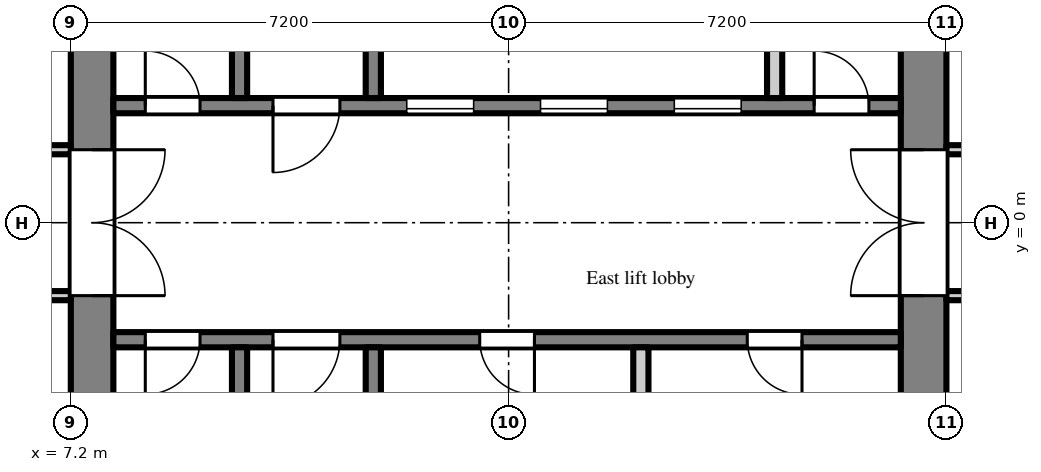
"""IFC4 building model, lengths in metres.
Left out: names, types, materials, properties, quantities, classifications, styles, units other than length and angle.
Written with IfcOpenShell. Run it as: python <this file> out.ifc"""

import sys

from ifc_helpers import new_model, si_unit, direction, frame, frame_2d, origin, place, context, subcontext, project, spatial, rectangle, extrude, element, fill, save


model = new_model("IFC4")
c1 = context("Model", 3, precision=1e-05, world=origin(), true_north=direction((0.0, 1.0)))
c2 = subcontext(c1, "Body", "Model", "MODEL_VIEW")
j1 = project(units=[si_unit("LENGTHUNIT", "METRE"), si_unit("PLANEANGLEUNIT", "RADIAN")], contexts=[c1])
p1 = place(None, origin())
s1 = spatial("IfcSite", under=j1, at=p1, CompositionType="ELEMENT")
p2 = place(p1, origin())
s2 = spatial("IfcBuilding", under=s1, at=p2, CompositionType="ELEMENT")
p3 = place(p2, frame((0.0, 0.0, 201.9)))
s3 = spatial("IfcBuildingStorey", under=s2, at=p3, CompositionType="ELEMENT", Elevation=201.9)
p4 = place(p3, frame((7.55, -7.2, 0.0), z_axis=(0.0, 0.0, 1.0), x_axis=(0.0, 1.0, 0.0)))
e1 = element("IfcWall", 1, at=p4, inside=s3, PredefinedType="SHEAR", context=c2, shape_type="SweptSolid", body=[
    extrude(rectangle(XDim=14.4, YDim=0.7, at=frame_2d((7.2, 0.0))), origin(), (0.0, 0.0, 1.0), 2.6),
])
p5 = place(p4, frame((6.0, 0.0, 0.0)))
e2 = element("IfcOpeningElement", 2, at=p5, cuts=e1, PredefinedType="OPENING", context=c2, shape_type="SweptSolid", body=[
    extrude(rectangle(XDim=2.4, YDim=2.2, at=frame_2d((1.2, 1.1))), frame((0.0, 0.36, 0.0), z_axis=(0.0, -1.0, 0.0), x_axis=(1.0, 0.0, 0.0)), (0.0, 0.0, 1.0), 0.72),
])
p6 = place(p3, frame((21.225, -7.2, 0.0), z_axis=(0.0, 0.0, 1.0), x_axis=(0.0, 1.0, 0.0)))
e3 = element("IfcWall", 3, at=p6, inside=s3, PredefinedType="SHEAR", context=c2, shape_type="SweptSolid", body=[
    extrude(rectangle(XDim=14.4, YDim=0.75, at=frame_2d((7.2, 0.0))), origin(), (0.0, 0.0, 1.0), 2.6),
])
p7 = place(p6, frame((6.0, 0.0, 0.0)))
e4 = element("IfcOpeningElement", 4, at=p7, cuts=e3, PredefinedType="OPENING", context=c2, shape_type="SweptSolid", body=[
    extrude(rectangle(XDim=2.4, YDim=2.2, at=frame_2d((1.2, 1.1))), frame((0.0, 0.385, 0.0), z_axis=(0.0, -1.0, 0.0), x_axis=(1.0, 0.0, 0.0)), (0.0, 0.0, 1.0), 0.77),
])
p8 = place(p3, frame((7.9, 1.925, 0.0), z_axis=(0.0, 0.0, 1.0), x_axis=(1.0, 0.0, 0.0)))
e5 = element("IfcWall", 5, at=p8, inside=s3, PredefinedType="SHEAR", context=c2, shape_type="SweptSolid", body=[
    extrude(rectangle(XDim=12.95, YDim=0.25, at=frame_2d((6.475, 0.0))), origin(), (0.0, 0.0, 1.0), 2.6),
])
p9 = place(p8, frame((4.825, 0.0, 0.0)))
e6 = element("IfcOpeningElement", 6, at=p9, cuts=e5, PredefinedType="OPENING", context=c2, shape_type="SweptSolid", body=[
    extrude(rectangle(XDim=1.1, YDim=2.1, at=frame_2d((0.55, 1.05))), frame((0.0, 0.135, 0.0), z_axis=(0.0, -1.0, 0.0), x_axis=(1.0, 0.0, 0.0)), (0.0, 0.0, 1.0), 0.27),
])
p10 = place(p8, frame((7.025, 0.0, 0.0)))
e7 = element("IfcOpeningElement", 7, at=p10, cuts=e5, PredefinedType="OPENING", context=c2, shape_type="SweptSolid", body=[
    extrude(rectangle(XDim=1.1, YDim=2.1, at=frame_2d((0.55, 1.05))), frame((0.0, 0.135, 0.0), z_axis=(0.0, -1.0, 0.0), x_axis=(1.0, 0.0, 0.0)), (0.0, 0.0, 1.0), 0.27),
])
p11 = place(p8, frame((9.225, 0.0, 0.0)))
e8 = element("IfcOpeningElement", 8, at=p11, cuts=e5, PredefinedType="OPENING", context=c2, shape_type="SweptSolid", body=[
    extrude(rectangle(XDim=1.1, YDim=2.1, at=frame_2d((0.55, 1.05))), frame((0.0, 0.135, 0.0), z_axis=(0.0, -1.0, 0.0), x_axis=(1.0, 0.0, 0.0)), (0.0, 0.0, 1.0), 0.27),
])
p12 = place(p8, frame((0.525, 0.0, 0.0)))
e9 = element("IfcOpeningElement", 9, at=p12, cuts=e5, PredefinedType="OPENING", context=c2, shape_type="SweptSolid", body=[
    extrude(rectangle(XDim=0.9, YDim=2.1, at=frame_2d((0.45, 1.05))), frame((0.0, 0.135, 0.0), z_axis=(0.0, -1.0, 0.0), x_axis=(1.0, 0.0, 0.0)), (0.0, 0.0, 1.0), 0.27),
])
p13 = place(p8, frame((2.625, 0.0, 0.0)))
e10 = element("IfcOpeningElement", 10, at=p13, cuts=e5, PredefinedType="OPENING", context=c2, shape_type="SweptSolid", body=[
    extrude(rectangle(XDim=1.1, YDim=2.1, at=frame_2d((0.55, 1.05))), frame((0.0, 0.135, 0.0), z_axis=(0.0, -1.0, 0.0), x_axis=(1.0, 0.0, 0.0)), (0.0, 0.0, 1.0), 0.27),
])
p14 = place(p8, frame((11.525, 0.0, 0.0)))
e11 = element("IfcOpeningElement", 11, at=p14, cuts=e5, PredefinedType="OPENING", context=c2, shape_type="SweptSolid", body=[
    extrude(rectangle(XDim=0.9, YDim=2.1, at=frame_2d((0.45, 1.05))), frame((0.0, 0.135, 0.0), z_axis=(0.0, -1.0, 0.0), x_axis=(1.0, 0.0, 0.0)), (0.0, 0.0, 1.0), 0.27),
])
p15 = place(p3, frame((9.975, 2.05, 0.0), z_axis=(0.0, 0.0, 1.0), x_axis=(0.0, 1.0, 0.0)))
e12 = element("IfcWall", 12, at=p15, inside=s3, PredefinedType="SHEAR", context=c2, shape_type="SweptSolid", body=[
    extrude(rectangle(XDim=4.75, YDim=0.25, at=frame_2d((2.375, 0.0))), origin(), (0.0, 0.0, 1.0), 2.6),
])
p16 = place(p15, frame((2.95, 0.0, 0.0)))
e13 = element("IfcOpeningElement", 13, at=p16, cuts=e12, PredefinedType="OPENING", context=c2, shape_type="SweptSolid", body=[
    extrude(rectangle(XDim=1.1, YDim=2.1, at=frame_2d((0.55, 1.05))), frame((0.0, 0.135, 0.0), z_axis=(0.0, -1.0, 0.0), x_axis=(1.0, 0.0, 0.0)), (0.0, 0.0, 1.0), 0.27),
])
p17 = place(p3, frame((12.175, 2.05, 0.0), z_axis=(0.0, 0.0, 1.0), x_axis=(0.0, 1.0, 0.0)))
e14 = element("IfcWall", 14, at=p17, inside=s3, PredefinedType="SHEAR", context=c2, shape_type="SweptSolid", body=[
    extrude(rectangle(XDim=4.75, YDim=0.25, at=frame_2d((2.375, 0.0))), origin(), (0.0, 0.0, 1.0), 2.6),
])
p18 = place(p17, frame((3.0, 0.0, 0.0)))
e15 = element("IfcOpeningElement", 15, at=p18, cuts=e14, PredefinedType="OPENING", context=c2, shape_type="SweptSolid", body=[
    extrude(rectangle(XDim=1.1, YDim=2.1, at=frame_2d((0.55, 1.05))), frame((0.0, 0.135, 0.0), z_axis=(0.0, -1.0, 0.0), x_axis=(1.0, 0.0, 0.0)), (0.0, 0.0, 1.0), 0.27),
])
p19 = place(p3, frame((18.775, 2.05, 0.0), z_axis=(0.0, 0.0, 1.0), x_axis=(0.0, 1.0, 0.0)))
e16 = element("IfcWall", 16, at=p19, inside=s3, PredefinedType="PARTITIONING", context=c2, shape_type="SweptSolid", body=[
    extrude(rectangle(XDim=2.1, YDim=0.25, at=frame_2d((1.05, 0.0))), origin(), (0.0, 0.0, 1.0), 2.6),
])
p20 = place(p3, frame((7.9, -1.925, 0.0), z_axis=(0.0, 0.0, 1.0), x_axis=(1.0, 0.0, 0.0)))
e17 = element("IfcWall", 17, at=p20, inside=s3, PredefinedType="SHEAR", context=c2, shape_type="SweptSolid", body=[
    extrude(rectangle(XDim=12.95, YDim=0.25, at=frame_2d((6.475, 0.0))), origin(), (0.0, 0.0, 1.0), 2.6),
])
p21 = place(p20, frame((0.525, 0.0, 0.0)))
e18 = element("IfcOpeningElement", 18, at=p21, cuts=e17, PredefinedType="OPENING", context=c2, shape_type="SweptSolid", body=[
    extrude(rectangle(XDim=0.9, YDim=2.1, at=frame_2d((0.45, 1.05))), frame((0.0, 0.135, 0.0), z_axis=(0.0, -1.0, 0.0), x_axis=(1.0, 0.0, 0.0)), (0.0, 0.0, 1.0), 0.27),
])
p22 = place(p20, frame((2.625, 0.0, 0.0)))
e19 = element("IfcOpeningElement", 19, at=p22, cuts=e17, PredefinedType="OPENING", context=c2, shape_type="SweptSolid", body=[
    extrude(rectangle(XDim=1.1, YDim=2.1, at=frame_2d((0.55, 1.05))), frame((0.0, 0.135, 0.0), z_axis=(0.0, -1.0, 0.0), x_axis=(1.0, 0.0, 0.0)), (0.0, 0.0, 1.0), 0.27),
])
p23 = place(p20, frame((6.025, 0.0, 0.0)))
e20 = element("IfcOpeningElement", 20, at=p23, cuts=e17, PredefinedType="OPENING", context=c2, shape_type="SweptSolid", body=[
    extrude(rectangle(XDim=0.9, YDim=2.1, at=frame_2d((0.45, 1.05))), frame((0.0, 0.135, 0.0), z_axis=(0.0, -1.0, 0.0), x_axis=(1.0, 0.0, 0.0)), (0.0, 0.0, 1.0), 0.27),
])
p24 = place(p20, frame((10.425, 0.0, 0.0)))
e21 = element("IfcOpeningElement", 21, at=p24, cuts=e17, PredefinedType="OPENING", context=c2, shape_type="SweptSolid", body=[
    extrude(rectangle(XDim=0.9, YDim=2.1, at=frame_2d((0.45, 1.05))), frame((0.0, 0.135, 0.0), z_axis=(0.0, -1.0, 0.0), x_axis=(1.0, 0.0, 0.0)), (0.0, 0.0, 1.0), 0.27),
])
p25 = place(p3, frame((9.975, -2.05, 0.0), z_axis=(0.0, 0.0, 1.0), x_axis=(0.0, -1.0, 0.0)))
e22 = element("IfcWall", 22, at=p25, inside=s3, PredefinedType="SHEAR", context=c2, shape_type="SweptSolid", body=[
    extrude(rectangle(XDim=4.75, YDim=0.25, at=frame_2d((2.375, 0.0))), origin(), (0.0, 0.0, 1.0), 2.6),
])
p26 = place(p25, frame((2.95, 0.0, 0.0)))
e23 = element("IfcOpeningElement", 23, at=p26, cuts=e22, PredefinedType="OPENING", context=c2, shape_type="SweptSolid", body=[
    extrude(rectangle(XDim=1.1, YDim=2.1, at=frame_2d((0.55, 1.05))), frame((0.0, 0.135, 0.0), z_axis=(0.0, -1.0, 0.0), x_axis=(1.0, 0.0, 0.0)), (0.0, 0.0, 1.0), 0.27),
])
p27 = place(p3, frame((12.175, -2.05, 0.0), z_axis=(0.0, 0.0, 1.0), x_axis=(0.0, -1.0, 0.0)))
e24 = element("IfcWall", 24, at=p27, inside=s3, PredefinedType="SHEAR", context=c2, shape_type="SweptSolid", body=[
    extrude(rectangle(XDim=4.75, YDim=0.25, at=frame_2d((2.375, 0.0))), origin(), (0.0, 0.0, 1.0), 2.6),
])
p28 = place(p27, frame((3.0, 0.0, 0.0)))
e25 = element("IfcOpeningElement", 25, at=p28, cuts=e24, PredefinedType="OPENING", context=c2, shape_type="SweptSolid", body=[
    extrude(rectangle(XDim=1.1, YDim=2.1, at=frame_2d((0.55, 1.05))), frame((0.0, 0.135, 0.0), z_axis=(0.0, -1.0, 0.0), x_axis=(1.0, 0.0, 0.0)), (0.0, 0.0, 1.0), 0.27),
])
p29 = place(p3, frame((16.575, -2.05, 0.0), z_axis=(0.0, 0.0, 1.0), x_axis=(0.0, -1.0, 0.0)))
e26 = element("IfcWall", 26, at=p29, inside=s3, PredefinedType="PARTITIONING", context=c2, shape_type="SweptSolid", body=[
    extrude(rectangle(XDim=2.1, YDim=0.25, at=frame_2d((1.05, 0.0))), origin(), (0.0, 0.0, 1.0), 2.6),
])
p30 = place(p3, frame((1.275, -1.2, 0.0), z_axis=(0.0, 0.0, 1.0), x_axis=(1.0, 0.0, 0.0)))
e27 = element("IfcWall", 27, at=p30, inside=s3, PredefinedType="PARTITIONING", context=c2, shape_type="SweptSolid", body=[
    extrude(rectangle(XDim=5.925, YDim=0.15, at=frame_2d((2.962, 0.0))), origin(), (0.0, 0.0, 1.0), 2.6),
])
p31 = place(p30, frame((3.075, 0.0, 0.0)))
e28 = element("IfcOpeningElement", 28, at=p31, cuts=e27, PredefinedType="OPENING", context=c2, shape_type="SweptSolid", body=[
    extrude(rectangle(XDim=0.9, YDim=2.1, at=frame_2d((0.45, 1.05))), frame((0.0, 0.085, 0.0), z_axis=(0.0, -1.0, 0.0), x_axis=(1.0, 0.0, 0.0)), (0.0, 0.0, 1.0), 0.17),
])
p32 = place(p3, frame((1.275, 1.2, 0.0), z_axis=(0.0, 0.0, 1.0), x_axis=(1.0, 0.0, 0.0)))
e29 = element("IfcWall", 29, at=p32, inside=s3, PredefinedType="PARTITIONING", context=c2, shape_type="SweptSolid", body=[
    extrude(rectangle(XDim=5.925, YDim=0.15, at=frame_2d((2.962, 0.0))), origin(), (0.0, 0.0, 1.0), 2.6),
])
p33 = place(p32, frame((3.975, 0.0, 0.0)))
e30 = element("IfcOpeningElement", 30, at=p33, cuts=e29, PredefinedType="OPENING", context=c2, shape_type="SweptSolid", body=[
    extrude(rectangle(XDim=0.9, YDim=2.1, at=frame_2d((0.45, 1.05))), frame((0.0, 0.085, 0.0), z_axis=(0.0, -1.0, 0.0), x_axis=(1.0, 0.0, 0.0)), (0.0, 0.0, 1.0), 0.17),
])
p34 = place(p3, frame((21.6, -1.2, 0.0), z_axis=(0.0, 0.0, 1.0), x_axis=(1.0, 0.0, 0.0)))
e31 = element("IfcWall", 31, at=p34, inside=s3, PredefinedType="PARTITIONING", context=c2, shape_type="SweptSolid", body=[
    extrude(rectangle(XDim=3.525, YDim=0.15, at=frame_2d((1.762, 0.0))), origin(), (0.0, 0.0, 1.0), 2.6),
])
p35 = place(p34, frame((0.9, 0.0, 0.0)))
e32 = element("IfcOpeningElement", 32, at=p35, cuts=e31, PredefinedType="OPENING", context=c2, shape_type="SweptSolid", body=[
    extrude(rectangle(XDim=1.8, YDim=2.1, at=frame_2d((0.9, 1.05))), frame((0.0, 0.085, 0.0), z_axis=(0.0, -1.0, 0.0), x_axis=(1.0, 0.0, 0.0)), (0.0, 0.0, 1.0), 0.17),
])
p36 = place(p3, frame((21.6, 1.2, 0.0), z_axis=(0.0, 0.0, 1.0), x_axis=(1.0, 0.0, 0.0)))
e33 = element("IfcWall", 33, at=p36, inside=s3, PredefinedType="PARTITIONING", context=c2, shape_type="SweptSolid", body=[
    extrude(rectangle(XDim=3.525, YDim=0.15, at=frame_2d((1.762, 0.0))), origin(), (0.0, 0.0, 1.0), 2.6),
])
p37 = place(p36, frame((0.9, 0.0, 0.0)))
e34 = element("IfcOpeningElement", 34, at=p37, cuts=e33, PredefinedType="OPENING", context=c2, shape_type="SweptSolid", body=[
    extrude(rectangle(XDim=1.8, YDim=2.1, at=frame_2d((0.9, 1.05))), frame((0.0, 0.085, 0.0), z_axis=(0.0, -1.0, 0.0), x_axis=(1.0, 0.0, 0.0)), (0.0, 0.0, 1.0), 0.17),
])
p38 = place(p9, origin())
e35 = element("IfcDoor", 35, at=p38, inside=s3, OperationType="SLIDING_TO_LEFT", PredefinedType="DOOR", context=c2, shape_type="SweptSolid", body=[
    extrude(rectangle(XDim=1.1, YDim=2.1, at=frame_2d((0.55, 1.05))), frame((0.0, 0.025, 0.0), z_axis=(0.0, -1.0, 0.0), x_axis=(1.0, 0.0, 0.0)), (0.0, 0.0, 1.0), 0.05),
])
fill(e6, e35)
p39 = place(p10, origin())
e36 = element("IfcDoor", 36, at=p39, inside=s3, OperationType="SLIDING_TO_LEFT", PredefinedType="DOOR", context=c2, shape_type="SweptSolid", body=[
    extrude(rectangle(XDim=1.1, YDim=2.1, at=frame_2d((0.55, 1.05))), frame((0.0, 0.025, 0.0), z_axis=(0.0, -1.0, 0.0), x_axis=(1.0, 0.0, 0.0)), (0.0, 0.0, 1.0), 0.05),
])
fill(e7, e36)
p40 = place(p11, origin())
e37 = element("IfcDoor", 37, at=p40, inside=s3, OperationType="SLIDING_TO_LEFT", PredefinedType="DOOR", context=c2, shape_type="SweptSolid", body=[
    extrude(rectangle(XDim=1.1, YDim=2.1, at=frame_2d((0.55, 1.05))), frame((0.0, 0.025, 0.0), z_axis=(0.0, -1.0, 0.0), x_axis=(1.0, 0.0, 0.0)), (0.0, 0.0, 1.0), 0.05),
])
fill(e8, e37)
p41 = place(p12, origin())
e38 = element("IfcDoor", 38, at=p41, inside=s3, OperationType="SINGLE_SWING_LEFT", PredefinedType="DOOR", context=c2, shape_type="SweptSolid", body=[
    extrude(rectangle(XDim=0.9, YDim=2.1, at=frame_2d((0.45, 1.05))), frame((0.0, 0.025, 0.0), z_axis=(0.0, -1.0, 0.0), x_axis=(1.0, 0.0, 0.0)), (0.0, 0.0, 1.0), 0.05),
])
fill(e9, e38)
p42 = place(p21, frame((0.9, 0.0, 0.0), z_axis=(0.0, 0.0, 1.0), x_axis=(-1.0, 0.0, 0.0)))
e39 = element("IfcDoor", 39, at=p42, inside=s3, OperationType="SINGLE_SWING_RIGHT", PredefinedType="DOOR", context=c2, shape_type="SweptSolid", body=[
    extrude(rectangle(XDim=0.9, YDim=2.1, at=frame_2d((0.45, 1.05))), frame((0.0, 0.025, 0.0), z_axis=(0.0, -1.0, 0.0), x_axis=(1.0, 0.0, 0.0)), (0.0, 0.0, 1.0), 0.05),
])
fill(e18, e39)
p43 = place(p13, frame((1.1, 0.0, 0.0), z_axis=(0.0, 0.0, 1.0), x_axis=(-1.0, 0.0, 0.0)))
e40 = element("IfcDoor", 40, at=p43, inside=s3, OperationType="SINGLE_SWING_RIGHT", PredefinedType="DOOR", context=c2, shape_type="SweptSolid", body=[
    extrude(rectangle(XDim=1.1, YDim=2.1, at=frame_2d((0.55, 1.05))), frame((0.0, 0.025, 0.0), z_axis=(0.0, -1.0, 0.0), x_axis=(1.0, 0.0, 0.0)), (0.0, 0.0, 1.0), 0.05),
])
fill(e10, e40)
p44 = place(p22, frame((1.1, 0.0, 0.0), z_axis=(0.0, 0.0, 1.0), x_axis=(-1.0, 0.0, 0.0)))
e41 = element("IfcDoor", 41, at=p44, inside=s3, OperationType="SINGLE_SWING_RIGHT", PredefinedType="DOOR", context=c2, shape_type="SweptSolid", body=[
    extrude(rectangle(XDim=1.1, YDim=2.1, at=frame_2d((0.55, 1.05))), frame((0.0, 0.025, 0.0), z_axis=(0.0, -1.0, 0.0), x_axis=(1.0, 0.0, 0.0)), (0.0, 0.0, 1.0), 0.05),
])
fill(e19, e41)
p45 = place(p5, frame((2.4, 0.0, 0.0), z_axis=(0.0, 0.0, 1.0), x_axis=(-1.0, 0.0, 0.0)))
e42 = element("IfcDoor", 42, at=p45, inside=s3, OperationType="DOUBLE_DOOR_DOUBLE_SWING", PredefinedType="DOOR", context=c2, shape_type="SweptSolid", body=[
    extrude(rectangle(XDim=2.4, YDim=2.2, at=frame_2d((1.2, 1.1))), frame((0.0, 0.025, 0.0), z_axis=(0.0, -1.0, 0.0), x_axis=(1.0, 0.0, 0.0)), (0.0, 0.0, 1.0), 0.05),
])
fill(e2, e42)
p46 = place(p7, origin())
e43 = element("IfcDoor", 43, at=p46, inside=s3, OperationType="DOUBLE_DOOR_DOUBLE_SWING", PredefinedType="DOOR", context=c2, shape_type="SweptSolid", body=[
    extrude(rectangle(XDim=2.4, YDim=2.2, at=frame_2d((1.2, 1.1))), frame((0.0, 0.025, 0.0), z_axis=(0.0, -1.0, 0.0), x_axis=(1.0, 0.0, 0.0)), (0.0, 0.0, 1.0), 0.05),
])
fill(e4, e43)
p47 = place(p14, origin())
e44 = element("IfcDoor", 44, at=p47, inside=s3, OperationType="SINGLE_SWING_LEFT", PredefinedType="DOOR", context=c2, shape_type="SweptSolid", body=[
    extrude(rectangle(XDim=0.9, YDim=2.1, at=frame_2d((0.45, 1.05))), frame((0.0, 0.025, 0.0), z_axis=(0.0, -1.0, 0.0), x_axis=(1.0, 0.0, 0.0)), (0.0, 0.0, 1.0), 0.05),
])
fill(e11, e44)
p48 = place(p23, frame((0.9, 0.0, 0.0), z_axis=(0.0, 0.0, 1.0), x_axis=(-1.0, 0.0, 0.0)))
e45 = element("IfcDoor", 45, at=p48, inside=s3, OperationType="SINGLE_SWING_LEFT", PredefinedType="DOOR", context=c2, shape_type="SweptSolid", body=[
    extrude(rectangle(XDim=0.9, YDim=2.1, at=frame_2d((0.45, 1.05))), frame((0.0, 0.025, 0.0), z_axis=(0.0, -1.0, 0.0), x_axis=(1.0, 0.0, 0.0)), (0.0, 0.0, 1.0), 0.05),
])
fill(e20, e45)
p49 = place(p24, frame((0.9, 0.0, 0.0), z_axis=(0.0, 0.0, 1.0), x_axis=(-1.0, 0.0, 0.0)))
e46 = element("IfcDoor", 46, at=p49, inside=s3, OperationType="SINGLE_SWING_LEFT", PredefinedType="DOOR", context=c2, shape_type="SweptSolid", body=[
    extrude(rectangle(XDim=0.9, YDim=2.1, at=frame_2d((0.45, 1.05))), frame((0.0, 0.025, 0.0), z_axis=(0.0, -1.0, 0.0), x_axis=(1.0, 0.0, 0.0)), (0.0, 0.0, 1.0), 0.05),
])
fill(e21, e46)
save(model, sys.argv[1])
